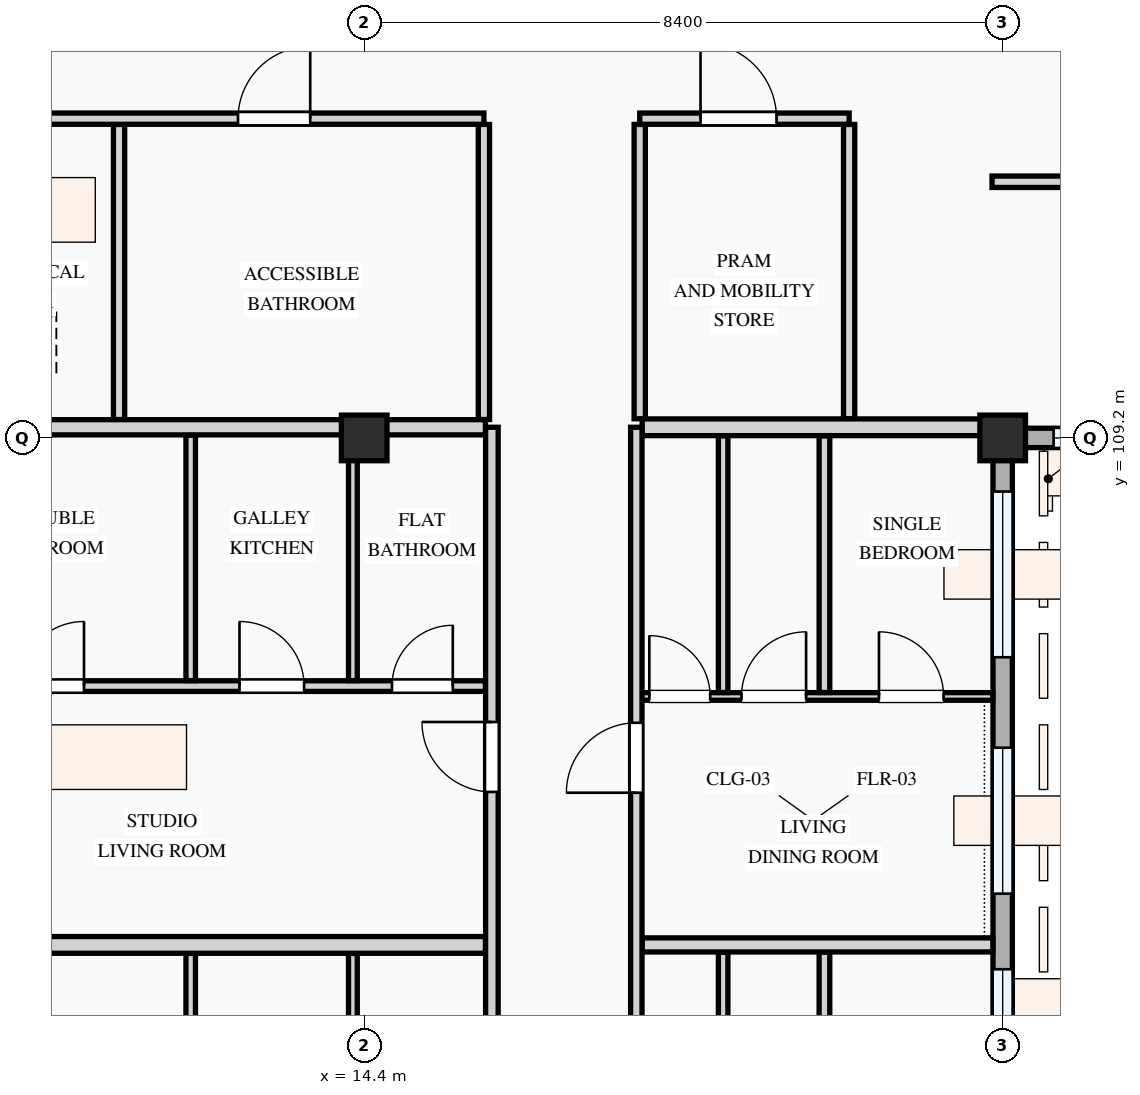
"""IFC4 building model, lengths in metres.
Left out: names, types, materials, properties, quantities, classifications, styles, units other than length and angle.
Written with IfcOpenShell. Run it as: python <this file> out.ifc"""

import sys

from ifc_helpers import new_model, si_unit, direction, frame, frame_2d, origin, origin_2d, place, context, subcontext, project, spatial, rectangle, extrude, element, fill, save


model = new_model("IFC4")
c1 = context("Model", 3, precision=1e-05, world=origin(), true_north=direction((0.0, 1.0)))
c2 = subcontext(c1, "Body", "Model", "MODEL_VIEW")
j1 = project(units=[si_unit("LENGTHUNIT", "METRE"), si_unit("PLANEANGLEUNIT", "RADIAN")], contexts=[c1])
p1 = place(None, origin())
s1 = spatial("IfcSite", under=j1, at=p1, CompositionType="ELEMENT")
p2 = place(p1, origin())
s2 = spatial("IfcBuilding", under=s1, at=p2, CompositionType="ELEMENT")
p3 = place(p2, frame((0.0, 0.0, 37.8)))
s3 = spatial("IfcBuildingStorey", under=s2, at=p3, CompositionType="ELEMENT", Elevation=37.8)
for number, where, z_axis, x_axis in (
    (1, (14.4, 109.2, 0.0), (0.0, 0.0, 1.0), (1.0, 0.0, 0.0)),
    (2, (22.8, 109.2, 0.0), (0.0, 0.0, 1.0), (1.0, 0.0, 0.0)),
):
    element("IfcColumn", number, at=place(p3, frame(where, z_axis=z_axis, x_axis=x_axis)), inside=s3, PredefinedType="COLUMN", context=c2, shape_type="SweptSolid", body=[
        extrude(rectangle(XDim=0.6, YDim=0.6, at=origin_2d()), origin(), (0.0, 0.0, 1.0), 3.3),
    ])
p4 = place(p3, frame((22.8, 109.2, 0.0), z_axis=(0.0, 0.0, 1.0), x_axis=(1.0, 0.0, 0.0)))
e3 = element("IfcWall", 3, at=p4, inside=s3, PredefinedType="STANDARD", context=c2, shape_type="SweptSolid", body=[
    extrude(rectangle(XDim=6.0, YDim=0.255, at=frame_2d((3.0, 0.0))), origin(), (0.0, 0.0, 1.0), 2.525),
])
p5 = place(p4, frame((0.67, 0.0, 0.78)))
e4 = element("IfcOpeningElement", 4, at=p5, cuts=e3, PredefinedType="OPENING", context=c2, shape_type="SweptSolid", body=[
    extrude(rectangle(XDim=1.2, YDim=1.35, at=frame_2d((0.6, 0.675))), frame((0.0, 0.137, 0.0), z_axis=(0.0, -1.0, 0.0), x_axis=(1.0, 0.0, 0.0)), (0.0, 0.0, 1.0), 0.275),
])
p6 = place(p4, frame((3.48, 0.0, 0.78)))
e5 = element("IfcOpeningElement", 5, at=p6, cuts=e3, PredefinedType="OPENING", context=c2, shape_type="SweptSolid", body=[
    extrude(rectangle(XDim=1.2, YDim=1.5, at=frame_2d((0.6, 0.75))), frame((0.0, 0.137, 0.0), z_axis=(0.0, -1.0, 0.0), x_axis=(1.0, 0.0, 0.0)), (0.0, 0.0, 1.0), 0.275),
])
p7 = place(p3, frame((22.8, 100.8, 0.0), z_axis=(0.0, 0.0, 1.0), x_axis=(0.0, 1.0, 0.0)))
e6 = element("IfcWall", 6, at=p7, inside=s3, PredefinedType="STANDARD", context=c2, shape_type="SweptSolid", body=[
    extrude(rectangle(XDim=8.4, YDim=0.255, at=frame_2d((4.2, 0.0))), origin(), (0.0, 0.0, 1.0), 2.425),
])
p8 = place(p7, frame((0.51, 0.0, 0.78)))
e7 = element("IfcOpeningElement", 7, at=p8, cuts=e6, PredefinedType="OPENING", context=c2, shape_type="SweptSolid", body=[
    extrude(rectangle(XDim=0.9, YDim=1.2, at=frame_2d((0.45, 0.6))), frame((0.0, 0.137, 0.0), z_axis=(0.0, -1.0, 0.0), x_axis=(1.0, 0.0, 0.0)), (0.0, 0.0, 1.0), 0.275),
])
p9 = place(p7, frame((2.404, 0.0, 0.78)))
e8 = element("IfcOpeningElement", 8, at=p9, cuts=e6, PredefinedType="OPENING", context=c2, shape_type="SweptSolid", body=[
    extrude(rectangle(XDim=1.92, YDim=1.44, at=frame_2d((0.96, 0.72))), frame((0.0, 0.137, 0.0), z_axis=(0.0, -1.0, 0.0), x_axis=(1.0, 0.0, 0.0)), (0.0, 0.0, 1.0), 0.275),
])
p10 = place(p7, frame((5.514, 0.0, 0.78)))
e9 = element("IfcOpeningElement", 9, at=p10, cuts=e6, PredefinedType="OPENING", context=c2, shape_type="SweptSolid", body=[
    extrude(rectangle(XDim=2.18, YDim=1.48, at=frame_2d((1.09, 0.74))), frame((0.0, 0.137, 0.0), z_axis=(0.0, -1.0, 0.0), x_axis=(1.0, 0.0, 0.0)), (0.0, 0.0, 1.0), 0.275),
])
for number, where, z_axis, x_axis in (
    (10, (11.175, 113.324, 0.0), (0.0, 0.0, 1.0), (0.0, -1.0, 0.0)),
    (11, (15.975, 113.324, 0.0), (0.0, 0.0, 1.0), (0.0, -1.0, 0.0)),
):
    element("IfcWall", number, at=place(p3, frame(where, z_axis=z_axis, x_axis=x_axis)), inside=s3, PredefinedType="PARTITIONING", context=c2, shape_type="SweptSolid", body=[
        extrude(rectangle(XDim=3.882, YDim=0.148, at=frame_2d((1.941, 0.0))), origin(), (0.0, 0.0, 1.0), 3.0),
    ])
for number, where, z_axis, x_axis in (
    (12, (18.025, 113.324, 0.0), (0.0, 0.0, 1.0), (0.0, -1.0, 0.0)),
    (13, (20.78, 113.324, 0.0), (0.0, 0.0, 1.0), (0.0, -1.0, 0.0)),
):
    element("IfcWall", number, at=place(p3, frame(where, z_axis=z_axis, x_axis=x_axis)), inside=s3, PredefinedType="PARTITIONING", context=c2, shape_type="SweptSolid", body=[
        extrude(rectangle(XDim=3.872, YDim=0.148, at=frame_2d((1.936, 0.0))), origin(), (0.0, 0.0, 1.0), 3.0),
    ])
p11 = place(p3, frame((8.54, 113.4, 0.0), z_axis=(0.0, 0.0, 1.0), x_axis=(1.0, 0.0, 0.0)))
e14 = element("IfcWall", 14, at=p11, inside=s3, PredefinedType="PARTITIONING", context=c2, shape_type="SweptSolid", body=[
    extrude(rectangle(XDim=7.435, YDim=0.148, at=frame_2d((3.718, 0.0))), origin(), (0.0, 0.0, 1.0), 3.0),
])
p12 = place(p11, frame((0.65, 0.0, 0.0)))
e15 = element("IfcOpeningElement", 15, at=p12, cuts=e14, PredefinedType="OPENING", context=c2, shape_type="SweptSolid", body=[
    extrude(rectangle(XDim=0.9, YDim=2.1, at=frame_2d((0.45, 1.05))), frame((0.0, 0.084, 0.0), z_axis=(0.0, -1.0, 0.0), x_axis=(1.0, 0.0, 0.0)), (0.0, 0.0, 1.0), 0.168),
])
p13 = place(p11, frame((4.2, 0.0, 0.0)))
e16 = element("IfcOpeningElement", 16, at=p13, cuts=e14, PredefinedType="OPENING", context=c2, shape_type="SweptSolid", body=[
    extrude(rectangle(XDim=0.95, YDim=2.1, at=frame_2d((0.475, 1.05))), frame((0.0, 0.084, 0.0), z_axis=(0.0, -1.0, 0.0), x_axis=(1.0, 0.0, 0.0)), (0.0, 0.0, 1.0), 0.168),
])
p14 = place(p3, frame((18.025, 113.4, 0.0), z_axis=(0.0, 0.0, 1.0), x_axis=(1.0, 0.0, 0.0)))
e17 = element("IfcWall", 17, at=p14, inside=s3, PredefinedType="PARTITIONING", context=c2, shape_type="SweptSolid", body=[
    extrude(rectangle(XDim=2.755, YDim=0.148, at=frame_2d((1.377, 0.0))), origin(), (0.0, 0.0, 1.0), 3.0),
])
p15 = place(p14, frame((0.8, 0.0, 0.0)))
e18 = element("IfcOpeningElement", 18, at=p15, cuts=e17, PredefinedType="OPENING", context=c2, shape_type="SweptSolid", body=[
    extrude(rectangle(XDim=1.0, YDim=2.15, at=frame_2d((0.5, 1.075))), frame((0.0, 0.084, 0.0), z_axis=(0.0, -1.0, 0.0), x_axis=(1.0, 0.0, 0.0)), (0.0, 0.0, 1.0), 0.168),
])
p16 = place(p3, frame((22.66, 112.57, 0.0), z_axis=(0.0, 0.0, 1.0), x_axis=(1.0, 0.0, 0.0)))
e19 = element("IfcWall", 19, at=p16, inside=s3, PredefinedType="PARTITIONING", context=c2, shape_type="SweptSolid", body=[
    extrude(rectangle(XDim=2.406, YDim=0.15, at=frame_2d((1.203, 0.0))), origin(), (0.0, 0.0, 1.0), 3.0),
])
p17 = place(p3, frame((12.118, 97.877, 0.0), z_axis=(0.0, 0.0, 1.0), x_axis=(0.0, 1.0, 0.0)))
e20 = element("IfcWall", 20, at=p17, inside=s3, PredefinedType="PARTITIONING", context=c2, shape_type="SweptSolid", body=[
    extrude(rectangle(XDim=4.541, YDim=0.125, at=frame_2d((2.271, 0.0))), origin(), (0.0, 0.0, 1.0), 3.0),
])
p18 = place(p3, frame((14.251, 97.877, 0.0), z_axis=(0.0, 0.0, 1.0), x_axis=(0.0, 1.0, 0.0)))
e21 = element("IfcWall", 21, at=p18, inside=s3, PredefinedType="PARTITIONING", context=c2, shape_type="SweptSolid", body=[
    extrude(rectangle(XDim=4.541, YDim=0.115, at=frame_2d((2.271, 0.0))), origin(), (0.0, 0.0, 1.0), 2.425),
])
p19 = place(p3, frame((20.455, 97.668, 0.0), z_axis=(0.0, 0.0, 1.0), x_axis=(0.0, 1.0, 0.0)))
e22 = element("IfcWall", 22, at=p19, inside=s3, PredefinedType="PARTITIONING", context=c2, shape_type="SweptSolid", body=[
    extrude(rectangle(XDim=4.768, YDim=0.14, at=frame_2d((2.384, 0.0))), origin(), (0.0, 0.0, 1.0), 3.0),
])
p20 = place(p3, frame((19.122, 97.668, 0.0), z_axis=(0.0, 0.0, 1.0), x_axis=(0.0, 1.0, 0.0)))
e23 = element("IfcWall", 23, at=p20, inside=s3, PredefinedType="PARTITIONING", context=c2, shape_type="SweptSolid", body=[
    extrude(rectangle(XDim=4.768, YDim=0.125, at=frame_2d((2.384, 0.0))), origin(), (0.0, 0.0, 1.0), 3.0),
])
p21 = place(p3, frame((8.53, 105.935, 0.0), z_axis=(0.0, 0.0, 1.0), x_axis=(1.0, 0.0, 0.0)))
e24 = element("IfcWall", 24, at=p21, inside=s3, PredefinedType="PARTITIONING", context=c2, shape_type="SweptSolid", body=[
    extrude(rectangle(XDim=7.466, YDim=0.14, at=frame_2d((3.733, 0.0))), origin(), (0.0, 0.0, 1.0), 3.0),
])
p22 = place(p21, frame((1.334, 0.0, 0.0)))
e25 = element("IfcOpeningElement", 25, at=p22, cuts=e24, PredefinedType="OPENING", context=c2, shape_type="SweptSolid", body=[
    extrude(rectangle(XDim=0.85, YDim=2.1, at=frame_2d((0.425, 1.05))), frame((0.0, 0.08, 0.0), z_axis=(0.0, -1.0, 0.0), x_axis=(1.0, 0.0, 0.0)), (0.0, 0.0, 1.0), 0.16),
])
p23 = place(p21, frame((4.23, 0.0, 0.0)))
e26 = element("IfcOpeningElement", 26, at=p23, cuts=e24, PredefinedType="OPENING", context=c2, shape_type="SweptSolid", body=[
    extrude(rectangle(XDim=0.85, YDim=2.1, at=frame_2d((0.425, 1.05))), frame((0.0, 0.08, 0.0), z_axis=(0.0, -1.0, 0.0), x_axis=(1.0, 0.0, 0.0)), (0.0, 0.0, 1.0), 0.16),
])
p24 = place(p21, frame((6.236, 0.0, 0.0)))
e27 = element("IfcOpeningElement", 27, at=p24, cuts=e24, PredefinedType="OPENING", context=c2, shape_type="SweptSolid", body=[
    extrude(rectangle(XDim=0.8, YDim=2.1, at=frame_2d((0.4, 1.05))), frame((0.0, 0.08, 0.0), z_axis=(0.0, -1.0, 0.0), x_axis=(1.0, 0.0, 0.0)), (0.0, 0.0, 1.0), 0.16),
])
p25 = place(p3, frame((12.118, 106.007, 0.0), z_axis=(0.0, 0.0, 1.0), x_axis=(0.0, 1.0, 0.0)))
e28 = element("IfcWall", 28, at=p25, inside=s3, PredefinedType="PARTITIONING", context=c2, shape_type="SweptSolid", body=[
    extrude(rectangle(XDim=3.231, YDim=0.125, at=frame_2d((1.615, 0.0))), origin(), (0.0, 0.0, 1.0), 3.0),
])
p26 = place(p3, frame((14.251, 106.007, 0.0), z_axis=(0.0, 0.0, 1.0), x_axis=(0.0, 1.0, 0.0)))
e29 = element("IfcWall", 29, at=p26, inside=s3, PredefinedType="PARTITIONING", context=c2, shape_type="SweptSolid", body=[
    extrude(rectangle(XDim=3.231, YDim=0.115, at=frame_2d((1.615, 0.0))), origin(), (0.0, 0.0, 1.0), 2.425),
])
p27 = place(p3, frame((17.98, 105.799, 0.0), z_axis=(0.0, 0.0, 1.0), x_axis=(1.0, 0.0, 0.0)))
e30 = element("IfcWall", 30, at=p27, inside=s3, PredefinedType="PARTITIONING", context=c2, shape_type="SweptSolid", body=[
    extrude(rectangle(XDim=4.69, YDim=0.1, at=frame_2d((2.345, 0.0))), origin(), (0.0, 0.0, 1.0), 3.0),
])
p28 = place(p27, frame((0.171, 0.0, 0.0)))
e31 = element("IfcOpeningElement", 31, at=p28, cuts=e30, PredefinedType="OPENING", context=c2, shape_type="SweptSolid", body=[
    extrude(rectangle(XDim=0.8, YDim=2.1, at=frame_2d((0.4, 1.05))), frame((0.0, 0.06, 0.0), z_axis=(0.0, -1.0, 0.0), x_axis=(1.0, 0.0, 0.0)), (0.0, 0.0, 1.0), 0.12),
])
p29 = place(p27, frame((1.384, 0.0, 0.0)))
e32 = element("IfcOpeningElement", 32, at=p29, cuts=e30, PredefinedType="OPENING", context=c2, shape_type="SweptSolid", body=[
    extrude(rectangle(XDim=0.85, YDim=2.1, at=frame_2d((0.425, 1.05))), frame((0.0, 0.06, 0.0), z_axis=(0.0, -1.0, 0.0), x_axis=(1.0, 0.0, 0.0)), (0.0, 0.0, 1.0), 0.12),
])
p30 = place(p27, frame((3.193, 0.0, 0.0)))
e33 = element("IfcOpeningElement", 33, at=p30, cuts=e30, PredefinedType="OPENING", context=c2, shape_type="SweptSolid", body=[
    extrude(rectangle(XDim=0.85, YDim=2.1, at=frame_2d((0.425, 1.05))), frame((0.0, 0.06, 0.0), z_axis=(0.0, -1.0, 0.0), x_axis=(1.0, 0.0, 0.0)), (0.0, 0.0, 1.0), 0.12),
])
p31 = place(p3, frame((20.455, 105.851, 0.0), z_axis=(0.0, 0.0, 1.0), x_axis=(0.0, 1.0, 0.0)))
e34 = element("IfcWall", 34, at=p31, inside=s3, PredefinedType="PARTITIONING", context=c2, shape_type="SweptSolid", body=[
    extrude(rectangle(XDim=3.377, YDim=0.14, at=frame_2d((1.688, 0.0))), origin(), (0.0, 0.0, 1.0), 3.0),
])
p32 = place(p3, frame((19.122, 105.851, 0.0), z_axis=(0.0, 0.0, 1.0), x_axis=(0.0, 1.0, 0.0)))
e35 = element("IfcWall", 35, at=p32, inside=s3, PredefinedType="PARTITIONING", context=c2, shape_type="SweptSolid", body=[
    extrude(rectangle(XDim=3.377, YDim=0.125, at=frame_2d((1.688, 0.0))), origin(), (0.0, 0.0, 1.0), 3.0),
])
p33 = place(p3, frame((8.53, 102.53, 0.0), z_axis=(0.0, 0.0, 1.0), x_axis=(1.0, 0.0, 0.0)))
e36 = element("IfcWall", 36, at=p33, inside=s3, PredefinedType="PARTITIONING", context=c2, shape_type="SweptSolid", body=[
    extrude(rectangle(XDim=7.466, YDim=0.22, at=frame_2d((3.733, 0.0))), origin(), (0.0, 0.0, 1.0), 3.0),
])
p34 = place(p3, frame((18.057, 102.53, 0.0), z_axis=(0.0, 0.0, 1.0), x_axis=(1.0, 0.0, 0.0)))
e37 = element("IfcWall", 37, at=p34, inside=s3, PredefinedType="PARTITIONING", context=c2, shape_type="SweptSolid", body=[
    extrude(rectangle(XDim=4.614, YDim=0.185, at=frame_2d((2.307, 0.0))), origin(), (0.0, 0.0, 1.0), 3.0),
])
p35 = place(p3, frame((8.53, 109.34, 0.0), z_axis=(0.0, 0.0, 1.0), x_axis=(1.0, 0.0, 0.0)))
e38 = element("IfcWall", 38, at=p35, inside=s3, PredefinedType="PARTITIONING", context=c2, shape_type="SweptSolid", body=[
    extrude(rectangle(XDim=7.466, YDim=0.2, at=frame_2d((3.733, 0.0))), origin(), (0.0, 0.0, 1.0), 2.375),
])
p36 = place(p3, frame((18.057, 109.34, 0.0), z_axis=(0.0, 0.0, 1.0), x_axis=(1.0, 0.0, 0.0)))
e39 = element("IfcWall", 39, at=p36, inside=s3, PredefinedType="PARTITIONING", context=c2, shape_type="SweptSolid", body=[
    extrude(rectangle(XDim=4.683, YDim=0.22, at=frame_2d((2.342, 0.0))), origin(), (0.0, 0.0, 1.0), 2.375),
])
p37 = place(p3, frame((16.08, 86.46, 0.0), z_axis=(0.0, 0.0, 1.0), x_axis=(0.0, 1.0, 0.0)))
e40 = element("IfcWall", 40, at=p37, inside=s3, PredefinedType="PARTITIONING", context=c2, shape_type="SweptSolid", body=[
    extrude(rectangle(XDim=22.88, YDim=0.165, at=frame_2d((11.44, 0.0))), origin(), (0.0, 0.0, 1.0), 3.0),
])
p38 = place(p37, frame((2.1, 0.0, 0.0)))
e41 = element("IfcOpeningElement", 41, at=p38, cuts=e40, PredefinedType="OPENING", context=c2, shape_type="SweptSolid", body=[
    extrude(rectangle(XDim=0.92, YDim=2.1, at=frame_2d((0.46, 1.05))), frame((0.0, 0.093, 0.0), z_axis=(0.0, -1.0, 0.0), x_axis=(1.0, 0.0, 0.0)), (0.0, 0.0, 1.0), 0.185),
])
p39 = place(p37, frame((10.135, 0.0, 0.0)))
e42 = element("IfcOpeningElement", 42, at=p39, cuts=e40, PredefinedType="OPENING", context=c2, shape_type="SweptSolid", body=[
    extrude(rectangle(XDim=0.92, YDim=2.1, at=frame_2d((0.46, 1.05))), frame((0.0, 0.093, 0.0), z_axis=(0.0, -1.0, 0.0), x_axis=(1.0, 0.0, 0.0)), (0.0, 0.0, 1.0), 0.185),
])
p40 = place(p37, frame((18.083, 0.0, 0.0)))
e43 = element("IfcOpeningElement", 43, at=p40, cuts=e40, PredefinedType="OPENING", context=c2, shape_type="SweptSolid", body=[
    extrude(rectangle(XDim=0.92, YDim=2.1, at=frame_2d((0.46, 1.05))), frame((0.0, 0.093, 0.0), z_axis=(0.0, -1.0, 0.0), x_axis=(1.0, 0.0, 0.0)), (0.0, 0.0, 1.0), 0.185),
])
p41 = place(p3, frame((17.98, 86.46, 0.0), z_axis=(0.0, 0.0, 1.0), x_axis=(0.0, 1.0, 0.0)))
e44 = element("IfcWall", 44, at=p41, inside=s3, PredefinedType="PARTITIONING", context=c2, shape_type="SweptSolid", body=[
    extrude(rectangle(XDim=22.88, YDim=0.15, at=frame_2d((11.44, 0.0))), origin(), (0.0, 0.0, 1.0), 3.0),
])
p42 = place(p41, frame((1.968, 0.0, 0.0)))
e45 = element("IfcOpeningElement", 45, at=p42, cuts=e44, PredefinedType="OPENING", context=c2, shape_type="SweptSolid", body=[
    extrude(rectangle(XDim=0.96, YDim=2.12, at=frame_2d((0.48, 1.06))), frame((0.0, 0.085, 0.0), z_axis=(0.0, -1.0, 0.0), x_axis=(1.0, 0.0, 0.0)), (0.0, 0.0, 1.0), 0.17),
])
p43 = place(p41, frame((9.946, 0.0, 0.0)))
e46 = element("IfcOpeningElement", 46, at=p43, cuts=e44, PredefinedType="OPENING", context=c2, shape_type="SweptSolid", body=[
    extrude(rectangle(XDim=0.92, YDim=2.1, at=frame_2d((0.46, 1.05))), frame((0.0, 0.085, 0.0), z_axis=(0.0, -1.0, 0.0), x_axis=(1.0, 0.0, 0.0)), (0.0, 0.0, 1.0), 0.17),
])
p44 = place(p41, frame((18.072, 0.0, 0.0)))
e47 = element("IfcOpeningElement", 47, at=p44, cuts=e44, PredefinedType="OPENING", context=c2, shape_type="SweptSolid", body=[
    extrude(rectangle(XDim=0.92, YDim=2.1, at=frame_2d((0.46, 1.05))), frame((0.0, 0.085, 0.0), z_axis=(0.0, -1.0, 0.0), x_axis=(1.0, 0.0, 0.0)), (0.0, 0.0, 1.0), 0.17),
])
p45 = place(p5, origin())
e48 = element("IfcWindow", 48, at=p45, inside=s3, PartitioningType="SINGLE_PANEL", PredefinedType="WINDOW", context=c2, shape_type="SweptSolid", body=[
    extrude(rectangle(XDim=1.2, YDim=1.35, at=frame_2d((0.6, 0.675))), frame((0.0, 0.03, 0.0), z_axis=(0.0, -1.0, 0.0), x_axis=(1.0, 0.0, 0.0)), (0.0, 0.0, 1.0), 0.06),
])
fill(e4, e48)
p46 = place(p8, origin())
e49 = element("IfcWindow", 49, at=p46, inside=s3, PartitioningType="SINGLE_PANEL", PredefinedType="WINDOW", context=c2, shape_type="SweptSolid", body=[
    extrude(rectangle(XDim=0.9, YDim=1.2, at=frame_2d((0.45, 0.6))), frame((0.0, 0.03, 0.0), z_axis=(0.0, -1.0, 0.0), x_axis=(1.0, 0.0, 0.0)), (0.0, 0.0, 1.0), 0.06),
])
fill(e7, e49)
p47 = place(p9, origin())
e50 = element("IfcWindow", 50, at=p47, inside=s3, PartitioningType="DOUBLE_PANEL_VERTICAL", PredefinedType="WINDOW", context=c2, shape_type="SweptSolid", body=[
    extrude(rectangle(XDim=1.92, YDim=1.44, at=frame_2d((0.96, 0.72))), frame((0.0, 0.03, 0.0), z_axis=(0.0, -1.0, 0.0), x_axis=(1.0, 0.0, 0.0)), (0.0, 0.0, 1.0), 0.06),
])
fill(e8, e50)
p48 = place(p10, origin())
e51 = element("IfcWindow", 51, at=p48, inside=s3, PartitioningType="DOUBLE_PANEL_VERTICAL", PredefinedType="WINDOW", context=c2, shape_type="SweptSolid", body=[
    extrude(rectangle(XDim=2.18, YDim=1.48, at=frame_2d((1.09, 0.74))), frame((0.0, 0.03, 0.0), z_axis=(0.0, -1.0, 0.0), x_axis=(1.0, 0.0, 0.0)), (0.0, 0.0, 1.0), 0.06),
])
fill(e9, e51)
p49 = place(p13, origin())
e52 = element("IfcDoor", 52, at=p49, inside=s3, OperationType="SINGLE_SWING_RIGHT", PredefinedType="DOOR", context=c2, shape_type="SweptSolid", body=[
    extrude(rectangle(XDim=0.95, YDim=2.1, at=frame_2d((0.475, 1.05))), frame((0.0, 0.025, 0.0), z_axis=(0.0, -1.0, 0.0), x_axis=(1.0, 0.0, 0.0)), (0.0, 0.0, 1.0), 0.05),
])
fill(e16, e52)
p50 = place(p15, origin())
e53 = element("IfcDoor", 53, at=p50, inside=s3, OperationType="SINGLE_SWING_LEFT", PredefinedType="DOOR", context=c2, shape_type="SweptSolid", body=[
    extrude(rectangle(XDim=1.0, YDim=2.15, at=frame_2d((0.5, 1.075))), frame((0.0, 0.025, 0.0), z_axis=(0.0, -1.0, 0.0), x_axis=(1.0, 0.0, 0.0)), (0.0, 0.0, 1.0), 0.05),
])
fill(e18, e53)
p51 = place(p22, origin())
e54 = element("IfcDoor", 54, at=p51, inside=s3, OperationType="SINGLE_SWING_RIGHT", PredefinedType="DOOR", context=c2, shape_type="SweptSolid", body=[
    extrude(rectangle(XDim=0.85, YDim=2.1, at=frame_2d((0.425, 1.05))), frame((0.0, 0.025, 0.0), z_axis=(0.0, -1.0, 0.0), x_axis=(1.0, 0.0, 0.0)), (0.0, 0.0, 1.0), 0.05),
])
fill(e25, e54)
p52 = place(p23, origin())
e55 = element("IfcDoor", 55, at=p52, inside=s3, OperationType="SINGLE_SWING_LEFT", PredefinedType="DOOR", context=c2, shape_type="SweptSolid", body=[
    extrude(rectangle(XDim=0.85, YDim=2.1, at=frame_2d((0.425, 1.05))), frame((0.0, 0.025, 0.0), z_axis=(0.0, -1.0, 0.0), x_axis=(1.0, 0.0, 0.0)), (0.0, 0.0, 1.0), 0.05),
])
fill(e26, e55)
p53 = place(p24, origin())
e56 = element("IfcDoor", 56, at=p53, inside=s3, OperationType="SINGLE_SWING_RIGHT", PredefinedType="DOOR", context=c2, shape_type="SweptSolid", body=[
    extrude(rectangle(XDim=0.8, YDim=2.1, at=frame_2d((0.4, 1.05))), frame((0.0, 0.025, 0.0), z_axis=(0.0, -1.0, 0.0), x_axis=(1.0, 0.0, 0.0)), (0.0, 0.0, 1.0), 0.05),
])
fill(e27, e56)
p54 = place(p28, origin())
e57 = element("IfcDoor", 57, at=p54, inside=s3, OperationType="SINGLE_SWING_LEFT", PredefinedType="DOOR", context=c2, shape_type="SweptSolid", body=[
    extrude(rectangle(XDim=0.8, YDim=2.1, at=frame_2d((0.4, 1.05))), frame((0.0, 0.025, 0.0), z_axis=(0.0, -1.0, 0.0), x_axis=(1.0, 0.0, 0.0)), (0.0, 0.0, 1.0), 0.05),
])
fill(e31, e57)
p55 = place(p29, origin())
e58 = element("IfcDoor", 58, at=p55, inside=s3, OperationType="SINGLE_SWING_RIGHT", PredefinedType="DOOR", context=c2, shape_type="SweptSolid", body=[
    extrude(rectangle(XDim=0.85, YDim=2.1, at=frame_2d((0.425, 1.05))), frame((0.0, 0.025, 0.0), z_axis=(0.0, -1.0, 0.0), x_axis=(1.0, 0.0, 0.0)), (0.0, 0.0, 1.0), 0.05),
])
fill(e32, e58)
p56 = place(p30, origin())
e59 = element("IfcDoor", 59, at=p56, inside=s3, OperationType="SINGLE_SWING_LEFT", PredefinedType="DOOR", context=c2, shape_type="SweptSolid", body=[
    extrude(rectangle(XDim=0.85, YDim=2.1, at=frame_2d((0.425, 1.05))), frame((0.0, 0.025, 0.0), z_axis=(0.0, -1.0, 0.0), x_axis=(1.0, 0.0, 0.0)), (0.0, 0.0, 1.0), 0.05),
])
fill(e33, e59)
p57 = place(p40, origin())
e60 = element("IfcDoor", 60, at=p57, inside=s3, OperationType="SINGLE_SWING_RIGHT", PredefinedType="DOOR", context=c2, shape_type="SweptSolid", body=[
    extrude(rectangle(XDim=0.92, YDim=2.1, at=frame_2d((0.46, 1.05))), frame((0.0, 0.025, 0.0), z_axis=(0.0, -1.0, 0.0), x_axis=(1.0, 0.0, 0.0)), (0.0, 0.0, 1.0), 0.05),
])
fill(e43, e60)
p58 = place(p44, origin())
e61 = element("IfcDoor", 61, at=p58, inside=s3, OperationType="SINGLE_SWING_LEFT", PredefinedType="DOOR", context=c2, shape_type="SweptSolid", body=[
    extrude(rectangle(XDim=0.92, YDim=2.1, at=frame_2d((0.46, 1.05))), frame((0.0, 0.025, 0.0), z_axis=(0.0, -1.0, 0.0), x_axis=(1.0, 0.0, 0.0)), (0.0, 0.0, 1.0), 0.05),
])
fill(e47, e61)
save(model, sys.argv[1])
